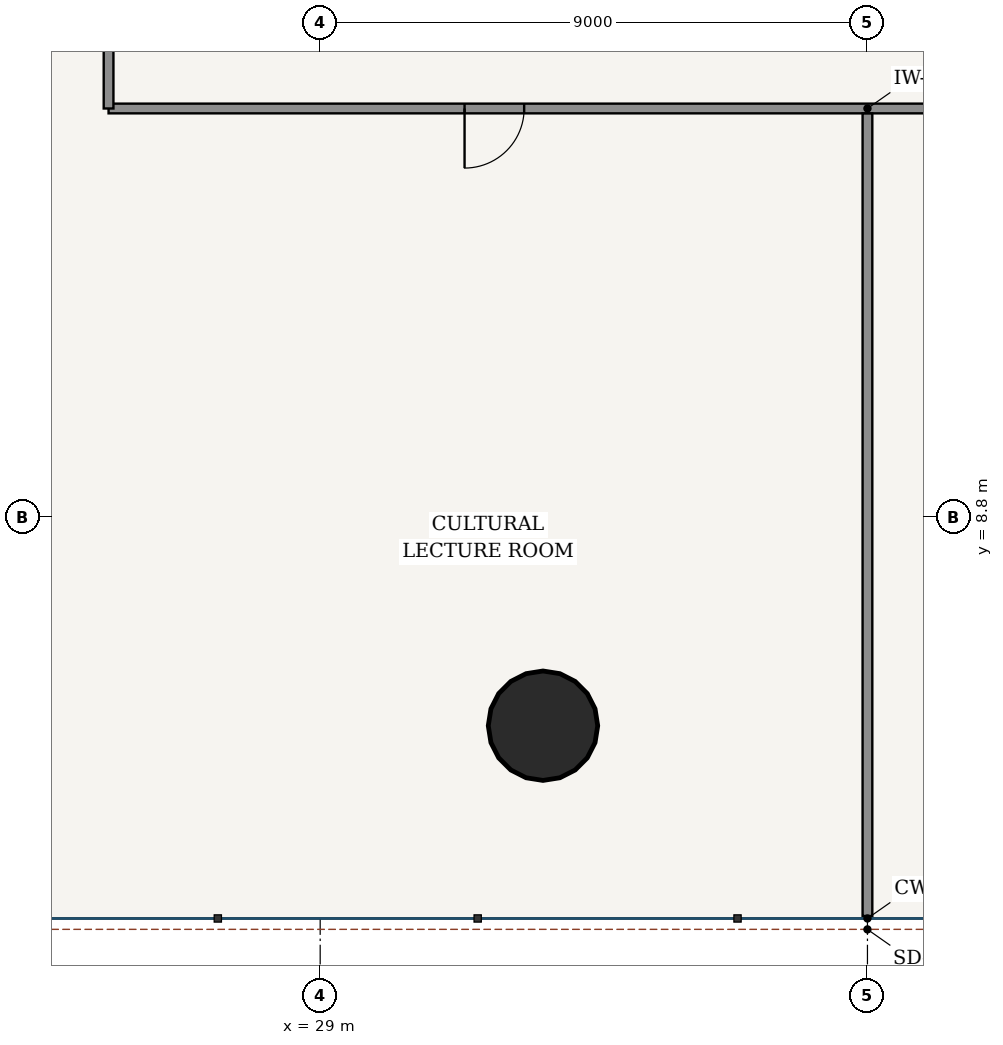
"""IFC4 building model, lengths in metres.
Left out: names, types, materials, properties, quantities, classifications, styles, units other than length and angle.
Written with IfcOpenShell. Run it as: python <this file> out.ifc"""

import sys

from ifc_helpers import new_model, si_unit, direction, frame, frame_2d, origin, origin_2d, place, context, subcontext, project, spatial, rectangle, hollow_circle, extrude, source, transform, mapped, element, fill, save


model = new_model("IFC4")
c1 = context("Model", 3, precision=1e-05, world=origin(), true_north=direction((-0.2419218956, 0.970295726276)))
c2 = subcontext(c1, "Body", "Model", "MODEL_VIEW")
j1 = project(units=[si_unit("LENGTHUNIT", "METRE"), si_unit("PLANEANGLEUNIT", "RADIAN")], contexts=[c1])
p1 = place(None, origin())
s1 = spatial("IfcSite", under=j1, at=p1, CompositionType="ELEMENT")
p2 = place(p1, origin())
s2 = spatial("IfcBuilding", under=s1, at=p2, CompositionType="ELEMENT")
p3 = place(p2, frame((0.0, 0.0, 5.4)))
s3 = spatial("IfcBuildingStorey", under=s2, at=p3, CompositionType="ELEMENT", Elevation=5.4)
p4 = place(p3, frame((32.664, 5.37, 0.0), z_axis=(0.0, 0.0, 1.0), x_axis=(1.0, 0.0, 0.0)))
e1 = element("IfcColumn", 1, at=p4, inside=s3, PredefinedType="COLUMN", context=c2, shape_type="SweptSolid", body=[
    extrude(hollow_circle(Radius=0.9, WallThickness=0.055, at=origin_2d()), origin(), (0.0, 0.0, 1.0), 4.5),
])
p5 = place(p3, frame((25.52, 15.52, 0.0), z_axis=(0.0, 0.0, 1.0), x_axis=(1.0, 0.0, 0.0)))
e2 = element("IfcWall", 2, at=p5, inside=s3, PredefinedType="PARTITIONING", context=c2, shape_type="SweptSolid", body=[
    extrude(rectangle(XDim=24.96, YDim=0.16, at=frame_2d((12.48, 0.0))), origin(), (0.0, 0.0, 1.0), 3.55),
])
p6 = place(p5, frame((5.854, 0.0, 0.0)))
e3 = element("IfcOpeningElement", 3, at=p6, cuts=e2, PredefinedType="OPENING", context=c2, shape_type="SweptSolid", body=[
    extrude(rectangle(XDim=0.98, YDim=2.2, at=frame_2d((0.49, 1.1))), frame((0.0, 0.09, 0.0), z_axis=(0.0, -1.0, 0.0), x_axis=(1.0, 0.0, 0.0)), (0.0, 0.0, 1.0), 0.18),
])
p7 = place(p5, frame((18.125, 0.0, 0.0)))
e4 = element("IfcOpeningElement", 4, at=p7, cuts=e2, PredefinedType="OPENING", context=c2, shape_type="SweptSolid", body=[
    extrude(rectangle(XDim=0.98, YDim=2.2, at=frame_2d((0.49, 1.1))), frame((0.0, 0.09, 0.0), z_axis=(0.0, -1.0, 0.0), x_axis=(1.0, 0.0, 0.0)), (0.0, 0.0, 1.0), 0.18),
])
p8 = place(p3, frame((25.52, 15.52, 0.0), z_axis=(0.0, 0.0, 1.0), x_axis=(0.0, 1.0, 0.0)))
e5 = element("IfcWall", 5, at=p8, inside=s3, PredefinedType="PARTITIONING", context=c2, shape_type="SweptSolid", body=[
    extrude(rectangle(XDim=21.56, YDim=0.16, at=frame_2d((10.78, 0.0))), origin(), (0.0, 0.0, 1.0), 3.55),
])
p9 = place(p8, frame((5.254, 0.0, 0.0)))
e6 = element("IfcOpeningElement", 6, at=p9, cuts=e5, PredefinedType="OPENING", context=c2, shape_type="SweptSolid", body=[
    extrude(rectangle(XDim=0.98, YDim=2.2, at=frame_2d((0.49, 1.1))), frame((0.0, 0.09, 0.0), z_axis=(0.0, -1.0, 0.0), x_axis=(1.0, 0.0, 0.0)), (0.0, 0.0, 1.0), 0.18),
])
p10 = place(p3, frame((38.0, 2.24, 0.0), z_axis=(0.0, 0.0, 1.0), x_axis=(0.0, 1.0, 0.0)))
e7 = element("IfcWall", 7, at=p10, inside=s3, PredefinedType="PARTITIONING", context=c2, shape_type="SweptSolid", body=[
    extrude(rectangle(XDim=13.198, YDim=0.16, at=frame_2d((6.599, 0.0))), origin(), (0.0, 0.0, 1.0), 3.642),
])
m1 = source(origin(), c2, "Body", "SweptSolid", [
    extrude(rectangle(XDim=0.98, YDim=2.2, at=frame_2d((0.49, 1.1))), frame((0.0, 0.025, 0.0), z_axis=(0.0, -1.0, 0.0), x_axis=(1.0, 0.0, 0.0)), (0.0, 0.0, 1.0), 0.05),
])
p11 = place(p6, frame((0.98, 0.0, 0.0), z_axis=(0.0, 0.0, 1.0), x_axis=(-1.0, 0.0, 0.0)))
e8 = element("IfcDoor", 8, at=p11, inside=s3, OperationType="SINGLE_SWING_RIGHT", PredefinedType="DOOR", context=c2, shape_type="MappedRepresentation", body=[
    mapped(m1, transform((0.0, 0.0, 0.0), scale=1.0)),
])
fill(e3, e8)
save(model, sys.argv[1])
